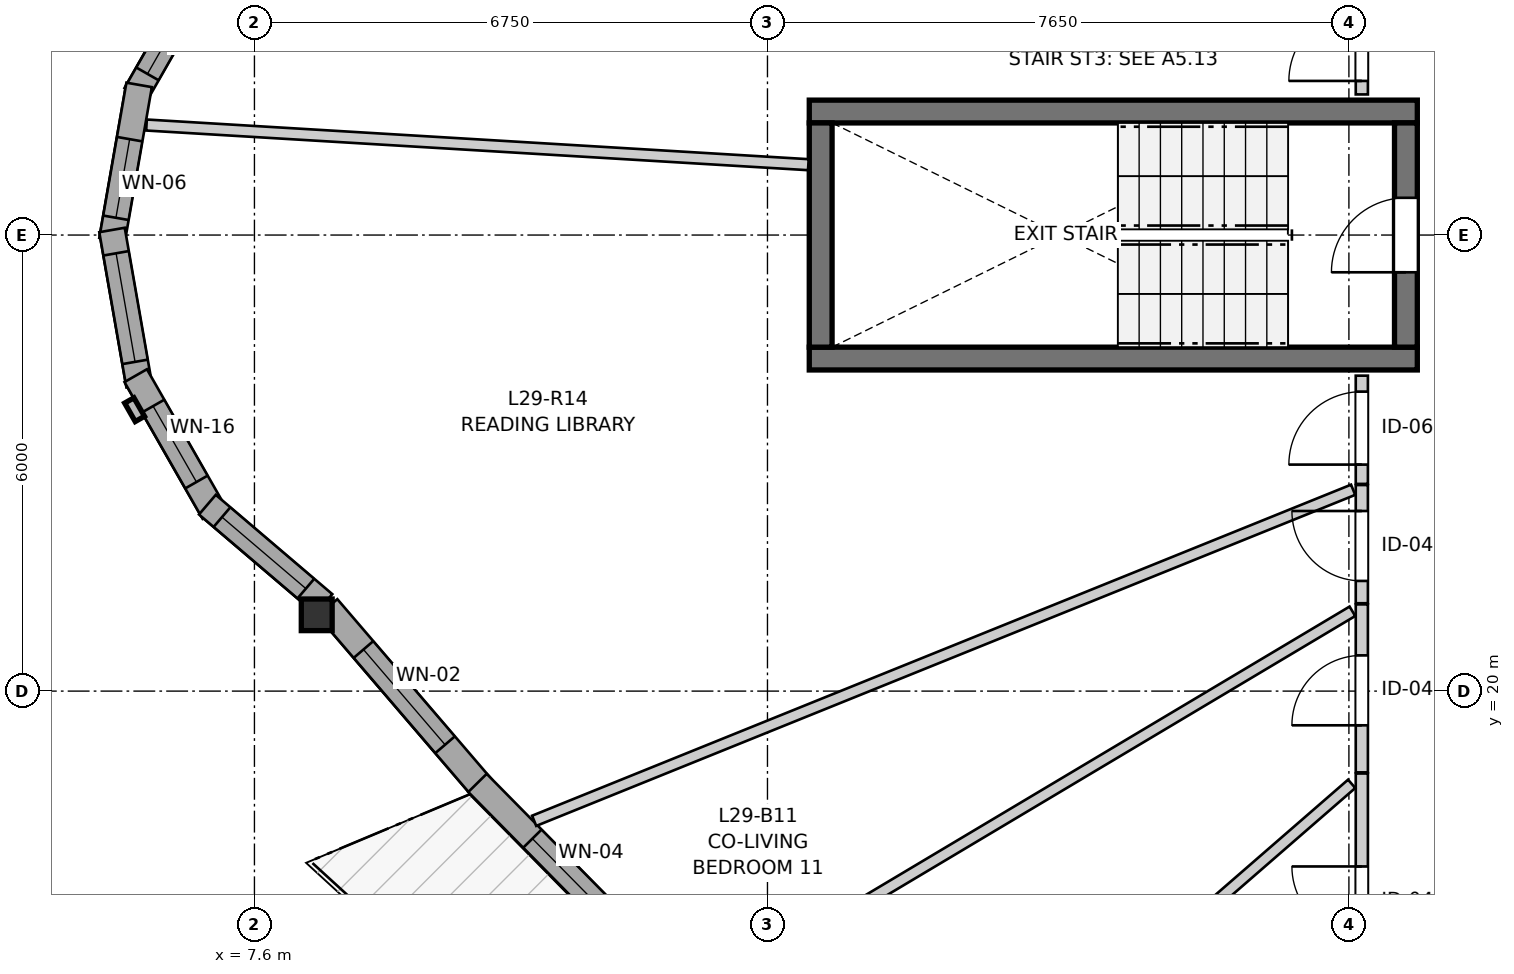
"""IFC4 building model, lengths in metres.
Left out: names, types, materials, properties, quantities, classifications, styles, units other than length and angle.
Written with IfcOpenShell. Run it as: python <this file> out.ifc"""

import sys

from ifc_helpers import new_model, si_unit, direction, frame, frame_2d, origin, origin_2d, place, context, subcontext, project, spatial, rectangle, i_section, extrude, source, transform, mapped, element, fill, save


model = new_model("IFC4")
c1 = context("Model", 3, precision=1e-05, world=origin(), true_north=direction((0.0, 1.0)))
c2 = subcontext(c1, "Body", "Model", "MODEL_VIEW")
j1 = project(units=[si_unit("LENGTHUNIT", "METRE"), si_unit("PLANEANGLEUNIT", "RADIAN")], contexts=[c1])
p1 = place(None, origin())
s1 = spatial("IfcSite", under=j1, at=p1, CompositionType="ELEMENT")
p2 = place(p1, origin())
s2 = spatial("IfcBuilding", under=s1, at=p2, CompositionType="ELEMENT")
p3 = place(p2, frame((0.0, 0.0, 99.2)))
s3 = spatial("IfcBuildingStorey", under=s2, at=p3, CompositionType="ELEMENT", Elevation=99.2)
for number, where, z_axis, x_axis in (
    (1, (14.9, 24.375, 0.0), (0.0, 0.0, 1.0), (1.0, 0.0, 0.0)),
    (2, (22.9, 27.625, 0.0), (0.0, 0.0, 1.0), (-1.0, 0.0, 0.0)),
):
    element("IfcWall", number, at=place(p3, frame(where, z_axis=z_axis, x_axis=x_axis)), inside=s3, PredefinedType="SHEAR", context=c2, shape_type="SweptSolid", body=[
        extrude(rectangle(XDim=8.0, YDim=0.3, at=frame_2d((4.0, 0.0))), origin(), (0.0, 0.0, 1.0), 2.95),
    ])
p4 = place(p3, frame((15.05, 27.475, 0.0), z_axis=(0.0, 0.0, 1.0), x_axis=(0.0, -1.0, 0.0)))
e3 = element("IfcWall", 3, at=p4, inside=s3, PredefinedType="SHEAR", context=c2, shape_type="SweptSolid", body=[
    extrude(rectangle(XDim=2.95, YDim=0.3, at=frame_2d((1.475, 0.0))), origin(), (0.0, 0.0, 1.0), 2.95),
])
p5 = place(p3, frame((22.75, 24.525, 0.0), z_axis=(0.0, 0.0, 1.0), x_axis=(0.0, 1.0, 0.0)))
e4 = element("IfcWall", 4, at=p5, inside=s3, PredefinedType="SHEAR", context=c2, shape_type="SweptSolid", body=[
    extrude(rectangle(XDim=2.95, YDim=0.3, at=frame_2d((1.475, 0.0))), origin(), (0.0, 0.0, 1.0), 2.95),
])
p6 = place(p5, frame((0.985, 0.0, 0.0)))
e5 = element("IfcOpeningElement", 5, at=p6, cuts=e4, PredefinedType="OPENING", context=c2, shape_type="SweptSolid", body=[
    extrude(rectangle(XDim=0.98, YDim=2.15, at=frame_2d((0.49, 1.075))), frame((0.0, 0.16, 0.0), z_axis=(0.0, -1.0, 0.0), x_axis=(1.0, 0.0, 0.0)), (0.0, 0.0, 1.0), 0.32),
])
m1 = source(origin(), c2, "Body", "SweptSolid", [
    extrude(i_section(OverallWidth=0.406, OverallDepth=0.416, WebThickness=0.027, FlangeThickness=0.044, FilletRadius=0.015, at=origin_2d()), origin(), (0.0, 0.0, 1.0), 2.95),
])
p7 = place(p3, frame((8.419, 21.004, 0.0), z_axis=(0.0, 0.0, 1.0), x_axis=(1.0, 0.0, 0.0)))
e6 = element("IfcColumn", 6, at=p7, inside=s3, PredefinedType="PILASTER", context=c2, shape_type="MappedRepresentation", body=[
    mapped(m1, transform((0.0, 0.0, 0.0), x_axis=(1.0, 0.0, 0.0), y_axis=(0.0, 1.0, 0.0), z_axis=(0.0, 0.0, 1.0), scale=1.0)),
])
p8 = place(p3, frame((7.066, 29.65, 0.0), z_axis=(0.0, 0.0, 1.0), x_axis=(-0.496037473582, -0.868301114132, 0.0)))
e7 = element("IfcWall", 7, at=p8, inside=s3, PredefinedType="SOLIDWALL", context=c2, shape_type="SweptSolid", body=[
    extrude(rectangle(XDim=2.073, YDim=0.34, at=frame_2d((1.037, 0.0))), origin(), (0.0, 0.0, 1.0), 2.48),
])
p9 = place(p8, frame((0.312, 0.0, 0.82)))
e8 = element("IfcOpeningElement", 8, at=p9, cuts=e7, PredefinedType="OPENING", context=c2, shape_type="SweptSolid", body=[
    extrude(rectangle(XDim=1.45, YDim=1.25, at=frame_2d((0.725, 0.625))), frame((0.0, 0.18, 0.0), z_axis=(0.0, -1.0, 0.0), x_axis=(1.0, 0.0, 0.0)), (0.0, 0.0, 1.0), 0.36),
])
p10 = place(p3, frame((6.083, 27.975, 0.0), z_axis=(0.0, 0.0, 1.0), x_axis=(-0.172186061474, -0.985064444711, 0.0)))
e9 = element("IfcWall", 9, at=p10, inside=s3, PredefinedType="SOLIDWALL", context=c2, shape_type="SweptSolid", body=[
    extrude(rectangle(XDim=2.073, YDim=0.34, at=frame_2d((1.037, 0.0))), origin(), (0.0, 0.0, 1.0), 2.48),
])
p11 = place(p10, frame((0.725, 0.0, 0.82)))
e10 = element("IfcOpeningElement", 10, at=p11, cuts=e9, PredefinedType="OPENING", context=c2, shape_type="SweptSolid", body=[
    extrude(rectangle(XDim=1.05, YDim=1.45, at=frame_2d((0.525, 0.725))), frame((0.0, 0.18, 0.0), z_axis=(0.0, -1.0, 0.0), x_axis=(1.0, 0.0, 0.0)), (0.0, 0.0, 1.0), 0.36),
])
p12 = place(p3, frame((5.726, 26.067, 0.0), z_axis=(0.0, 0.0, 1.0), x_axis=(0.172186061474, -0.985064444711, 0.0)))
e11 = element("IfcWall", 11, at=p12, inside=s3, PredefinedType="SOLIDWALL", context=c2, shape_type="SweptSolid", body=[
    extrude(rectangle(XDim=2.073, YDim=0.34, at=frame_2d((1.037, 0.0))), origin(), (0.0, 0.0, 1.0), 2.48),
])
p13 = place(p12, frame((0.312, 0.0, 0.82)))
e12 = element("IfcOpeningElement", 12, at=p13, cuts=e11, PredefinedType="OPENING", context=c2, shape_type="SweptSolid", body=[
    extrude(rectangle(XDim=1.45, YDim=1.25, at=frame_2d((0.725, 0.625))), frame((0.0, 0.18, 0.0), z_axis=(0.0, -1.0, 0.0), x_axis=(1.0, 0.0, 0.0)), (0.0, 0.0, 1.0), 0.36),
])
p14 = place(p3, frame((6.038, 24.15, 0.0), z_axis=(0.0, 0.0, 1.0), x_axis=(0.496037473582, -0.868301114132, 0.0)))
e13 = element("IfcWall", 13, at=p14, inside=s3, PredefinedType="SOLIDWALL", context=c2, shape_type="SweptSolid", body=[
    extrude(rectangle(XDim=2.073, YDim=0.34, at=frame_2d((1.037, 0.0))), origin(), (0.0, 0.0, 1.0), 2.48),
])
p15 = place(p14, frame((0.461, 0.0, 0.82)))
e14 = element("IfcOpeningElement", 14, at=p15, cuts=e13, PredefinedType="OPENING", context=c2, shape_type="SweptSolid", body=[
    extrude(rectangle(XDim=1.15, YDim=1.2, at=frame_2d((0.575, 0.6))), frame((0.0, 0.18, 0.0), z_axis=(0.0, -1.0, 0.0), x_axis=(1.0, 0.0, 0.0)), (0.0, 0.0, 1.0), 0.36),
])
p16 = place(p3, frame((6.981, 22.453, 0.0), z_axis=(0.0, 0.0, 1.0), x_axis=(0.761092561451, -0.648643286332, 0.0)))
e15 = element("IfcWall", 15, at=p16, inside=s3, PredefinedType="SOLIDWALL", context=c2, shape_type="SweptSolid", body=[
    extrude(rectangle(XDim=2.015, YDim=0.34, at=frame_2d((1.007, 0.0))), origin(), (0.0, 0.0, 1.0), 2.48),
])
p17 = place(p16, frame((0.252, 0.0, 0.82)))
e16 = element("IfcOpeningElement", 16, at=p17, cuts=e15, PredefinedType="OPENING", context=c2, shape_type="SweptSolid", body=[
    extrude(rectangle(XDim=1.45, YDim=1.25, at=frame_2d((0.725, 0.625))), frame((0.0, 0.18, 0.0), z_axis=(0.0, -1.0, 0.0), x_axis=(1.0, 0.0, 0.0)), (0.0, 0.0, 1.0), 0.36),
])
p18 = place(p3, frame((8.562, 21.099, 0.0), z_axis=(0.0, 0.0, 1.0), x_axis=(0.650778499588, -0.75926763692, 0.0)))
e17 = element("IfcWall", 17, at=p18, inside=s3, PredefinedType="SOLIDWALL", context=c2, shape_type="SweptSolid", body=[
    extrude(rectangle(XDim=3.124, YDim=0.34, at=frame_2d((1.562, 0.0))), origin(), (0.0, 0.0, 1.0), 2.48),
])
p19 = place(p18, frame((0.727, 0.0, 0.82)))
e18 = element("IfcOpeningElement", 18, at=p19, cuts=e17, PredefinedType="OPENING", context=c2, shape_type="SweptSolid", body=[
    extrude(rectangle(XDim=1.65, YDim=1.45, at=frame_2d((0.825, 0.725))), frame((0.0, 0.18, 0.0), z_axis=(0.0, -1.0, 0.0), x_axis=(1.0, 0.0, 0.0)), (0.0, 0.0, 1.0), 0.36),
])
p20 = place(p3, frame((10.535, 18.792, 0.0), z_axis=(0.0, 0.0, 1.0), x_axis=(0.701902141766, -0.7122733909, 0.0)))
e19 = element("IfcWall", 19, at=p20, inside=s3, PredefinedType="SOLIDWALL", context=c2, shape_type="SweptSolid", body=[
    extrude(rectangle(XDim=2.848, YDim=0.34, at=frame_2d((1.424, 0.0))), origin(), (0.0, 0.0, 1.0), 2.48),
])
p21 = place(p20, frame((1.029, 0.0, 0.82)))
e20 = element("IfcOpeningElement", 20, at=p21, cuts=e19, PredefinedType="OPENING", context=c2, shape_type="SweptSolid", body=[
    extrude(rectangle(XDim=1.35, YDim=1.45, at=frame_2d((0.675, 0.725))), frame((0.0, 0.18, 0.0), z_axis=(0.0, -1.0, 0.0), x_axis=(1.0, 0.0, 0.0)), (0.0, 0.0, 1.0), 0.36),
])
p22 = place(p3, frame((22.17, 15.57, 0.0), z_axis=(0.0, 0.0, 1.0), x_axis=(0.0, 1.0, 0.0)))
e21 = element("IfcWall", 21, at=p22, inside=s3, PredefinedType="PARTITIONING", context=c2, shape_type="SweptSolid", body=[
    extrude(rectangle(XDim=3.346, YDim=0.16, at=frame_2d((1.673, 0.0))), origin(), (0.0, 0.0, 1.0), 2.95),
])
p23 = place(p22, frame((1.203, 0.0, 0.0)))
e22 = element("IfcOpeningElement", 22, at=p23, cuts=e21, PredefinedType="OPENING", context=c2, shape_type="SweptSolid", body=[
    extrude(rectangle(XDim=0.92, YDim=2.1, at=frame_2d((0.46, 1.05))), frame((0.0, 0.09, 0.0), z_axis=(0.0, -1.0, 0.0), x_axis=(1.0, 0.0, 0.0)), (0.0, 0.0, 1.0), 0.18),
])
p24 = place(p3, frame((22.17, 18.931, 0.0), z_axis=(0.0, 0.0, 1.0), x_axis=(0.0, 1.0, 0.0)))
e23 = element("IfcWall", 23, at=p24, inside=s3, PredefinedType="PARTITIONING", context=c2, shape_type="SweptSolid", body=[
    extrude(rectangle(XDim=2.21, YDim=0.16, at=frame_2d((1.105, 0.0))), origin(), (0.0, 0.0, 1.0), 2.95),
])
p25 = place(p24, frame((0.619, 0.0, 0.0)))
e24 = element("IfcOpeningElement", 24, at=p25, cuts=e23, PredefinedType="OPENING", context=c2, shape_type="SweptSolid", body=[
    extrude(rectangle(XDim=0.92, YDim=2.1, at=frame_2d((0.46, 1.05))), frame((0.0, 0.09, 0.0), z_axis=(0.0, -1.0, 0.0), x_axis=(1.0, 0.0, 0.0)), (0.0, 0.0, 1.0), 0.18),
])
p26 = place(p3, frame((22.17, 21.156, 0.0), z_axis=(0.0, 0.0, 1.0), x_axis=(0.0, 1.0, 0.0)))
e25 = element("IfcWall", 25, at=p26, inside=s3, PredefinedType="PARTITIONING", context=c2, shape_type="SweptSolid", body=[
    extrude(rectangle(XDim=1.555, YDim=0.16, at=frame_2d((0.777, 0.0))), origin(), (0.0, 0.0, 1.0), 2.95),
])
p27 = place(p26, frame((0.293, 0.0, 0.0)))
e26 = element("IfcOpeningElement", 26, at=p27, cuts=e25, PredefinedType="OPENING", context=c2, shape_type="SweptSolid", body=[
    extrude(rectangle(XDim=0.92, YDim=2.1, at=frame_2d((0.46, 1.05))), frame((0.0, 0.09, 0.0), z_axis=(0.0, -1.0, 0.0), x_axis=(1.0, 0.0, 0.0)), (0.0, 0.0, 1.0), 0.18),
])
p28 = place(p3, frame((22.17, 22.726, 0.0), z_axis=(0.0, 0.0, 1.0), x_axis=(0.0, 1.0, 0.0)))
e27 = element("IfcWall", 27, at=p28, inside=s3, PredefinedType="PARTITIONING", context=c2, shape_type="SweptSolid", body=[
    extrude(rectangle(XDim=1.424, YDim=0.16, at=frame_2d((0.712, 0.0))), origin(), (0.0, 0.0, 1.0), 2.95),
])
p29 = place(p28, frame((0.254, 0.0, 0.0)))
e28 = element("IfcOpeningElement", 28, at=p29, cuts=e27, PredefinedType="OPENING", context=c2, shape_type="SweptSolid", body=[
    extrude(rectangle(XDim=0.96, YDim=2.1, at=frame_2d((0.48, 1.05))), frame((0.0, 0.09, 0.0), z_axis=(0.0, -1.0, 0.0), x_axis=(1.0, 0.0, 0.0)), (0.0, 0.0, 1.0), 0.18),
])
p30 = place(p3, frame((22.17, 27.85, 0.0), z_axis=(0.0, 0.0, 1.0), x_axis=(0.0, 1.0, 0.0)))
e29 = element("IfcWall", 29, at=p30, inside=s3, PredefinedType="PARTITIONING", context=c2, shape_type="SweptSolid", body=[
    extrude(rectangle(XDim=1.283, YDim=0.16, at=frame_2d((0.642, 0.0))), origin(), (0.0, 0.0, 1.0), 2.95),
])
p31 = place(p30, frame((0.177, 0.0, 0.0)))
e30 = element("IfcOpeningElement", 30, at=p31, cuts=e29, PredefinedType="OPENING", context=c2, shape_type="SweptSolid", body=[
    extrude(rectangle(XDim=0.96, YDim=2.1, at=frame_2d((0.48, 1.05))), frame((0.0, 0.09, 0.0), z_axis=(0.0, -1.0, 0.0), x_axis=(1.0, 0.0, 0.0)), (0.0, 0.0, 1.0), 0.18),
])
p32 = place(p3, frame((11.28, 18.294, 0.0), z_axis=(0.0, 0.0, 1.0), x_axis=(0.927137862507, 0.374720407645, 0.0)))
e31 = element("IfcWall", 31, at=p32, inside=s3, PredefinedType="PARTITIONING", context=c2, shape_type="SweptSolid", body=[
    extrude(rectangle(XDim=11.622, YDim=0.145, at=frame_2d((5.811, 0.0))), origin(), (0.0, 0.0, 1.0), 2.95),
])
p33 = place(p3, frame((13.622, 16.028, 0.0), z_axis=(0.0, 0.0, 1.0), x_axis=(0.85896108151, 0.512040877716, 0.0)))
e32 = element("IfcWall", 32, at=p33, inside=s3, PredefinedType="PARTITIONING", context=c2, shape_type="SweptSolid", body=[
    extrude(rectangle(XDim=9.807, YDim=0.145, at=frame_2d((4.904, 0.0))), origin(), (0.0, 0.0, 1.0), 2.95),
])
p34 = place(p3, frame((6.18, 27.448, 0.0), z_axis=(0.0, 0.0, 1.0), x_axis=(0.998209995059, -0.059806402362, 0.0)))
e33 = element("IfcWall", 33, at=p34, inside=s3, PredefinedType="PARTITIONING", context=c2, shape_type="SweptSolid", body=[
    extrude(rectangle(XDim=8.724, YDim=0.145, at=frame_2d((4.362, 0.0))), origin(), (0.0, 0.0, 1.0), 2.95),
])
p35 = place(p3, frame((19.736, 16.782, 0.0), z_axis=(0.0, 0.0, 1.0), x_axis=(0.754964216329, 0.655765988796, 0.0)))
e34 = element("IfcWall", 34, at=p35, inside=s3, PredefinedType="PARTITIONING", context=c2, shape_type="SweptSolid", body=[
    extrude(rectangle(XDim=3.047, YDim=0.145, at=frame_2d((1.523, 0.0))), origin(), (0.0, 0.0, 1.0), 2.95),
])
m2 = source(origin(), c2, "Body", "SweptSolid", [
    extrude(rectangle(XDim=1.45, YDim=1.25, at=frame_2d((0.725, 0.625))), frame((0.0, 0.03, 0.0), z_axis=(0.0, -1.0, 0.0), x_axis=(1.0, 0.0, 0.0)), (0.0, 0.0, 1.0), 0.06),
])
p36 = place(p9, origin())
e35 = element("IfcWindow", 35, at=p36, inside=s3, PartitioningType="SINGLE_PANEL", PredefinedType="WINDOW", context=c2, shape_type="MappedRepresentation", body=[
    mapped(m2, transform((0.0, 0.0, 0.0), x_axis=(1.0, 0.0, 0.0), y_axis=(0.0, 1.0, 0.0), z_axis=(0.0, 0.0, 1.0), scale=1.0)),
])
fill(e8, e35)
m3 = source(origin(), c2, "Body", "SweptSolid", [
    extrude(rectangle(XDim=1.05, YDim=1.45, at=frame_2d((0.525, 0.725))), frame((0.0, 0.03, 0.0), z_axis=(0.0, -1.0, 0.0), x_axis=(1.0, 0.0, 0.0)), (0.0, 0.0, 1.0), 0.06),
])
p37 = place(p11, origin())
e36 = element("IfcWindow", 36, at=p37, inside=s3, PartitioningType="SINGLE_PANEL", PredefinedType="WINDOW", context=c2, shape_type="MappedRepresentation", body=[
    mapped(m3, transform((0.0, 0.0, 0.0), x_axis=(1.0, 0.0, 0.0), y_axis=(0.0, 1.0, 0.0), z_axis=(0.0, 0.0, 1.0), scale=1.0)),
])
fill(e10, e36)
p38 = place(p13, origin())
e37 = element("IfcWindow", 37, at=p38, inside=s3, PartitioningType="SINGLE_PANEL", PredefinedType="WINDOW", context=c2, shape_type="MappedRepresentation", body=[
    mapped(m2, transform((0.0, 0.0, 0.0), x_axis=(1.0, 0.0, 0.0), y_axis=(0.0, 1.0, 0.0), z_axis=(0.0, 0.0, 1.0), scale=1.0)),
])
fill(e12, e37)
m4 = source(origin(), c2, "Body", "SweptSolid", [
    extrude(rectangle(XDim=1.15, YDim=1.2, at=frame_2d((0.575, 0.6))), frame((0.0, 0.03, 0.0), z_axis=(0.0, -1.0, 0.0), x_axis=(1.0, 0.0, 0.0)), (0.0, 0.0, 1.0), 0.06),
])
p39 = place(p15, origin())
e38 = element("IfcWindow", 38, at=p39, inside=s3, PartitioningType="SINGLE_PANEL", PredefinedType="WINDOW", context=c2, shape_type="MappedRepresentation", body=[
    mapped(m4, transform((0.0, 0.0, 0.0), x_axis=(1.0, 0.0, 0.0), y_axis=(0.0, 1.0, 0.0), z_axis=(0.0, 0.0, 1.0), scale=1.0)),
])
fill(e14, e38)
p40 = place(p17, origin())
e39 = element("IfcWindow", 39, at=p40, inside=s3, PartitioningType="SINGLE_PANEL", PredefinedType="WINDOW", context=c2, shape_type="MappedRepresentation", body=[
    mapped(m2, transform((0.0, 0.0, 0.0), x_axis=(1.0, 0.0, 0.0), y_axis=(0.0, 1.0, 0.0), z_axis=(0.0, 0.0, 1.0), scale=1.0)),
])
fill(e16, e39)
m5 = source(origin(), c2, "Body", "SweptSolid", [
    extrude(rectangle(XDim=1.65, YDim=1.45, at=frame_2d((0.825, 0.725))), frame((0.0, 0.03, 0.0), z_axis=(0.0, -1.0, 0.0), x_axis=(1.0, 0.0, 0.0)), (0.0, 0.0, 1.0), 0.06),
])
p41 = place(p19, origin())
e40 = element("IfcWindow", 40, at=p41, inside=s3, PartitioningType="SINGLE_PANEL", PredefinedType="WINDOW", context=c2, shape_type="MappedRepresentation", body=[
    mapped(m5, transform((0.0, 0.0, 0.0), x_axis=(1.0, 0.0, 0.0), y_axis=(0.0, 1.0, 0.0), z_axis=(0.0, 0.0, 1.0), scale=1.0)),
])
fill(e18, e40)
m6 = source(origin(), c2, "Body", "SweptSolid", [
    extrude(rectangle(XDim=1.35, YDim=1.45, at=frame_2d((0.675, 0.725))), frame((0.0, 0.03, 0.0), z_axis=(0.0, -1.0, 0.0), x_axis=(1.0, 0.0, 0.0)), (0.0, 0.0, 1.0), 0.06),
])
p42 = place(p21, origin())
e41 = element("IfcWindow", 41, at=p42, inside=s3, PartitioningType="SINGLE_PANEL", PredefinedType="WINDOW", context=c2, shape_type="MappedRepresentation", body=[
    mapped(m6, transform((0.0, 0.0, 0.0), x_axis=(1.0, 0.0, 0.0), y_axis=(0.0, 1.0, 0.0), z_axis=(0.0, 0.0, 1.0), scale=1.0)),
])
fill(e20, e41)
m7 = source(origin(), c2, "Body", "SweptSolid", [
    extrude(rectangle(XDim=0.98, YDim=2.15, at=frame_2d((0.49, 1.075))), frame((0.0, 0.025, 0.0), z_axis=(0.0, -1.0, 0.0), x_axis=(1.0, 0.0, 0.0)), (0.0, 0.0, 1.0), 0.05),
])
p43 = place(p6, origin())
e42 = element("IfcDoor", 42, at=p43, inside=s3, OperationType="SINGLE_SWING_LEFT", PredefinedType="DOOR", context=c2, shape_type="MappedRepresentation", body=[
    mapped(m7, transform((0.0, 0.0, 0.0), x_axis=(1.0, 0.0, 0.0), y_axis=(0.0, 1.0, 0.0), z_axis=(0.0, 0.0, 1.0), scale=1.0)),
])
fill(e5, e42)
m8 = source(origin(), c2, "Body", "SweptSolid", [
    extrude(rectangle(XDim=0.92, YDim=2.1, at=frame_2d((0.46, 1.05))), frame((0.0, 0.025, 0.0), z_axis=(0.0, -1.0, 0.0), x_axis=(1.0, 0.0, 0.0)), (0.0, 0.0, 1.0), 0.05),
])
p44 = place(p23, origin())
e43 = element("IfcDoor", 43, at=p44, inside=s3, OperationType="SINGLE_SWING_RIGHT", PredefinedType="DOOR", context=c2, shape_type="MappedRepresentation", body=[
    mapped(m8, transform((0.0, 0.0, 0.0), x_axis=(1.0, 0.0, 0.0), y_axis=(0.0, 1.0, 0.0), z_axis=(0.0, 0.0, 1.0), scale=1.0)),
])
fill(e22, e43)
p45 = place(p25, origin())
e44 = element("IfcDoor", 44, at=p45, inside=s3, OperationType="SINGLE_SWING_LEFT", PredefinedType="DOOR", context=c2, shape_type="MappedRepresentation", body=[
    mapped(m8, transform((0.0, 0.0, 0.0), x_axis=(1.0, 0.0, 0.0), y_axis=(0.0, 1.0, 0.0), z_axis=(0.0, 0.0, 1.0), scale=1.0)),
])
fill(e24, e44)
p46 = place(p27, origin())
e45 = element("IfcDoor", 45, at=p46, inside=s3, OperationType="SINGLE_SWING_RIGHT", PredefinedType="DOOR", context=c2, shape_type="MappedRepresentation", body=[
    mapped(m8, transform((0.0, 0.0, 0.0), x_axis=(1.0, 0.0, 0.0), y_axis=(0.0, 1.0, 0.0), z_axis=(0.0, 0.0, 1.0), scale=1.0)),
])
fill(e26, e45)
m9 = source(origin(), c2, "Body", "SweptSolid", [
    extrude(rectangle(XDim=0.96, YDim=2.1, at=frame_2d((0.48, 1.05))), frame((0.0, 0.025, 0.0), z_axis=(0.0, -1.0, 0.0), x_axis=(1.0, 0.0, 0.0)), (0.0, 0.0, 1.0), 0.05),
])
p47 = place(p29, origin())
e46 = element("IfcDoor", 46, at=p47, inside=s3, OperationType="SINGLE_SWING_LEFT", PredefinedType="DOOR", context=c2, shape_type="MappedRepresentation", body=[
    mapped(m9, transform((0.0, 0.0, 0.0), x_axis=(1.0, 0.0, 0.0), y_axis=(0.0, 1.0, 0.0), z_axis=(0.0, 0.0, 1.0), scale=1.0)),
])
fill(e28, e46)
p48 = place(p31, origin())
e47 = element("IfcDoor", 47, at=p48, inside=s3, OperationType="SINGLE_SWING_LEFT", PredefinedType="DOOR", context=c2, shape_type="MappedRepresentation", body=[
    mapped(m9, transform((0.0, 0.0, 0.0), x_axis=(1.0, 0.0, 0.0), y_axis=(0.0, 1.0, 0.0), z_axis=(0.0, 0.0, 1.0), scale=1.0)),
])
fill(e30, e47)
save(model, sys.argv[1])
